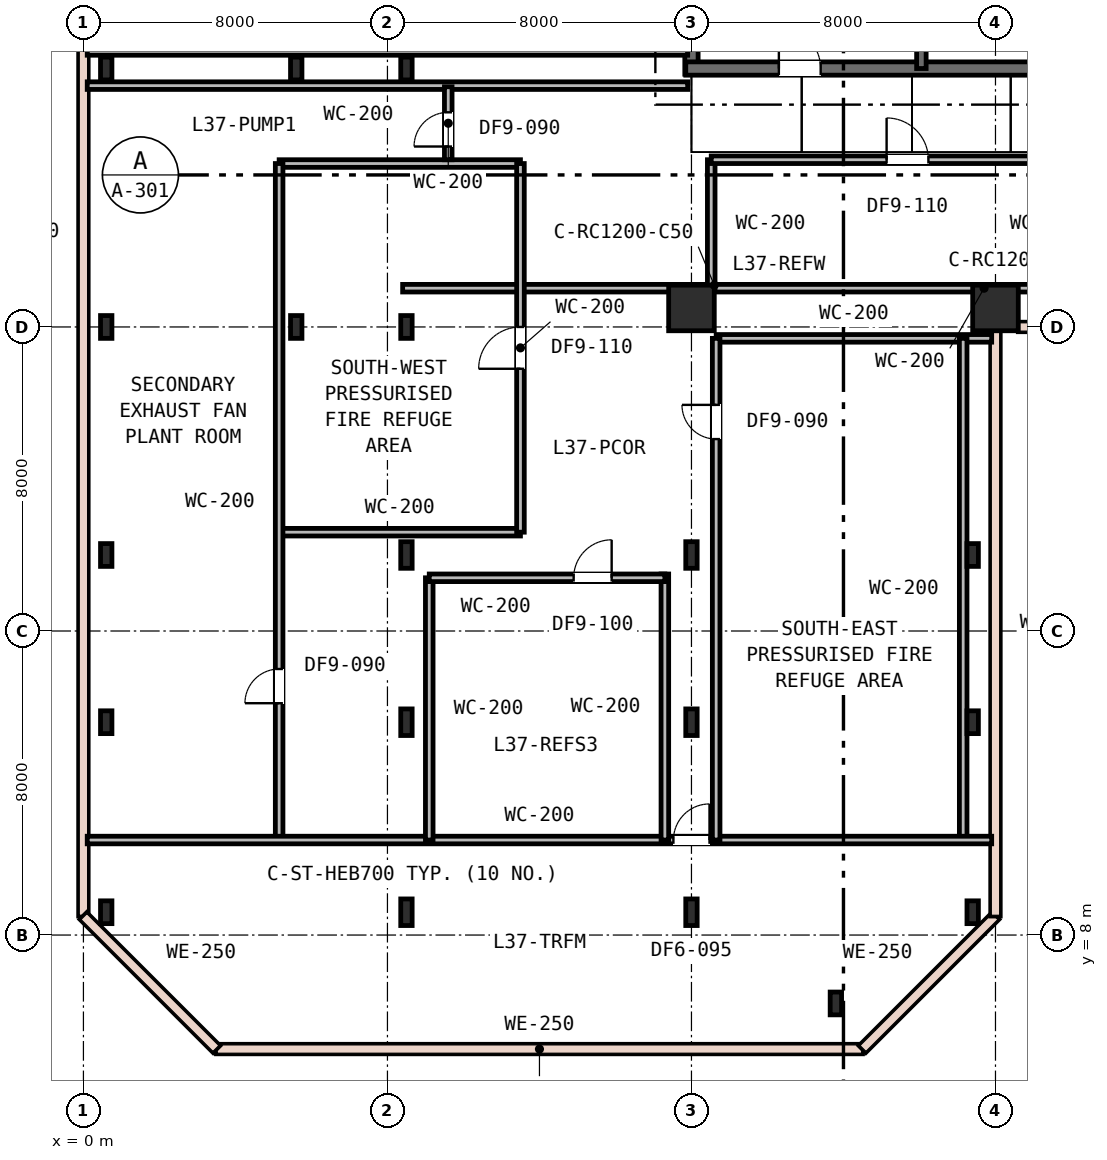
"""IFC4 building model, lengths in metres.
Left out: names, types, materials, properties, quantities, classifications, styles, units other than length and angle.
Written with IfcOpenShell. Run it as: python <this file> out.ifc"""

import sys

from ifc_helpers import new_model, si_unit, direction, frame, frame_2d, origin, origin_2d, place, context, subcontext, project, spatial, rectangle, i_section, extrude, element, fill, save


model = new_model("IFC4")
c1 = context("Model", 3, precision=1e-05, world=origin(), true_north=direction((0.0, 1.0)))
c2 = subcontext(c1, "Body", "Model", "MODEL_VIEW")
j1 = project(units=[si_unit("LENGTHUNIT", "METRE"), si_unit("PLANEANGLEUNIT", "RADIAN")], contexts=[c1])
p1 = place(None, origin())
s1 = spatial("IfcSite", under=j1, at=p1, CompositionType="ELEMENT")
p2 = place(p1, origin())
s2 = spatial("IfcBuilding", under=s1, at=p2, CompositionType="ELEMENT")
p3 = place(p2, frame((0.0, 0.0, 144.0)))
s3 = spatial("IfcBuildingStorey", under=s2, at=p3, CompositionType="ELEMENT", Elevation=144.0)
p4 = place(p3, frame((16.0, 30.65, 0.0), z_axis=(0.0, 0.0, 1.0), x_axis=(0.0, 1.0, 0.0)))
e1 = element("IfcWall", 1, at=p4, inside=s3, PredefinedType="SHEAR", context=c2, shape_type="SweptSolid", body=[
    extrude(rectangle(XDim=12.3, YDim=0.35, at=frame_2d((6.15, 0.0))), origin(), (0.0, 0.0, 1.0), 4.8),
])
p5 = place(p3, frame((15.85, 30.8, 0.0), z_axis=(0.0, 0.0, 1.0), x_axis=(1.0, 0.0, 0.0)))
e2 = element("IfcWall", 2, at=p5, inside=s3, PredefinedType="SHEAR", context=c2, shape_type="SweptSolid", body=[
    extrude(rectangle(XDim=11.2, YDim=0.35, at=frame_2d((5.6, 0.0))), origin(), (0.0, 0.0, 1.0), 4.8),
])
p6 = place(p5, frame((2.45, 0.0, 0.0)))
e3 = element("IfcOpeningElement", 3, at=p6, cuts=e2, PredefinedType="OPENING", context=c2, shape_type="SweptSolid", body=[
    extrude(rectangle(XDim=1.1, YDim=2.15, at=frame_2d((0.55, 1.075))), frame((0.0, 0.185, 0.0), z_axis=(0.0, -1.0, 0.0), x_axis=(1.0, 0.0, 0.0)), (0.0, 0.0, 1.0), 0.37),
])
p7 = place(p3, frame((22.05, 30.8, 0.0), z_axis=(0.0, 0.0, 1.0), x_axis=(0.0, 1.0, 0.0)))
e4 = element("IfcWall", 4, at=p7, inside=s3, PredefinedType="SHEAR", context=c2, shape_type="SweptSolid", body=[
    extrude(rectangle(XDim=6.45, YDim=0.25, at=frame_2d((3.225, 0.0))), origin(), (0.0, 0.0, 1.0), 4.8),
])
p8 = place(p3, frame((8.5, 24.0, 0.0), z_axis=(0.0, 0.0, 1.0), x_axis=(1.0, 0.0, 0.0)))
e5 = element("IfcColumn", 5, at=p8, inside=s3, PredefinedType="COLUMN", context=c2, shape_type="SweptSolid", body=[
    extrude(i_section(OverallWidth=0.3, OverallDepth=0.6, WebThickness=0.015, FlangeThickness=0.03, FilletRadius=0.027, at=origin_2d()), origin(), (0.0, 0.0, 1.0), 4.8),
])
for number, where, z_axis, x_axis in (
    (6, (16.0, 24.5, 0.0), (0.0, 0.0, 1.0), (1.0, 0.0, 0.0)),
    (7, (24.0, 24.5, 0.0), (0.0, 0.0, 1.0), (1.0, 0.0, 0.0)),
):
    element("IfcColumn", number, at=place(p3, frame(where, z_axis=z_axis, x_axis=x_axis)), inside=s3, PredefinedType="COLUMN", context=c2, shape_type="SweptSolid", body=[
        extrude(rectangle(XDim=1.2, YDim=1.2, at=origin_2d()), origin(), (0.0, 0.0, 1.0), 4.8),
    ])
for number, where, z_axis, x_axis in (
    (8, (5.6, 24.0, 0.0), (0.0, 0.0, 1.0), (1.0, 0.0, 0.0)),
    (9, (5.6, 30.8, 0.0), (0.0, 0.0, 1.0), (1.0, 0.0, 0.0)),
    (10, (8.5, 30.8, 0.0), (0.0, 0.0, 1.0), (1.0, 0.0, 0.0)),
):
    element("IfcColumn", number, at=place(p3, frame(where, z_axis=z_axis, x_axis=x_axis)), inside=s3, PredefinedType="COLUMN", context=c2, shape_type="SweptSolid", body=[
        extrude(i_section(OverallWidth=0.3, OverallDepth=0.6, WebThickness=0.015, FlangeThickness=0.03, FilletRadius=0.027, at=origin_2d()), origin(), (0.0, 0.0, 1.0), 4.8),
    ])
for number, where, z_axis, x_axis in (
    (11, (0.6, 24.0, 0.0), (0.0, 0.0, 1.0), (1.0, 0.0, 0.0)),
    (12, (0.6, 30.8, 0.0), (0.0, 0.0, 1.0), (1.0, 0.0, 0.0)),
    (13, (0.6, 8.6, 0.0), (0.0, 0.0, 1.0), (1.0, 0.0, 0.0)),
    (14, (0.6, 13.6, 0.0), (0.0, 0.0, 1.0), (1.0, 0.0, 0.0)),
    (15, (0.6, 18.0, 0.0), (0.0, 0.0, 1.0), (1.0, 0.0, 0.0)),
):
    element("IfcColumn", number, at=place(p3, frame(where, z_axis=z_axis, x_axis=x_axis)), inside=s3, PredefinedType="COLUMN", context=c2, shape_type="SweptSolid", body=[
        extrude(i_section(OverallWidth=0.3, OverallDepth=0.6, WebThickness=0.015, FlangeThickness=0.03, FilletRadius=0.027, at=origin_2d()), origin(), (0.0, 0.0, 1.0), 4.05),
    ])
for number, where, z_axis, x_axis in (
    (16, (19.8, 6.2, 0.0), (0.0, 0.0, 1.0), (1.0, 0.0, 0.0)),
    (17, (23.4, 8.6, 0.0), (0.0, 0.0, 1.0), (1.0, 0.0, 0.0)),
    (18, (23.4, 13.6, 0.0), (0.0, 0.0, 1.0), (1.0, 0.0, 0.0)),
    (19, (23.4, 18.0, 0.0), (0.0, 0.0, 1.0), (1.0, 0.0, 0.0)),
):
    element("IfcColumn", number, at=place(p3, frame(where, z_axis=z_axis, x_axis=x_axis)), inside=s3, PredefinedType="COLUMN", context=c2, shape_type="SweptSolid", body=[
        extrude(i_section(OverallWidth=0.3, OverallDepth=0.6, WebThickness=0.015, FlangeThickness=0.03, FilletRadius=0.027, at=origin_2d()), origin(), (0.0, 0.0, 1.0), 4.8),
    ])
for number, where, z_axis, x_axis in (
    (20, (8.5, 8.6, 0.0), (0.0, 0.0, 1.0), (1.0, 0.0, 0.0)),
    (21, (16.0, 8.6, 0.0), (0.0, 0.0, 1.0), (1.0, 0.0, 0.0)),
    (22, (8.5, 13.6, 0.0), (0.0, 0.0, 1.0), (1.0, 0.0, 0.0)),
    (23, (16.0, 13.6, 0.0), (0.0, 0.0, 1.0), (1.0, 0.0, 0.0)),
    (24, (8.5, 18.0, 0.0), (0.0, 0.0, 1.0), (1.0, 0.0, 0.0)),
    (25, (16.0, 18.0, 0.0), (0.0, 0.0, 1.0), (1.0, 0.0, 0.0)),
):
    element("IfcColumn", number, at=place(p3, frame(where, z_axis=z_axis, x_axis=x_axis)), inside=s3, PredefinedType="COLUMN", context=c2, shape_type="SweptSolid", body=[
        extrude(i_section(OverallWidth=0.3, OverallDepth=0.7, WebThickness=0.017, FlangeThickness=0.032, FilletRadius=0.027, at=origin_2d()), origin(), (0.0, 0.0, 1.0), 4.8),
    ])
p9 = place(p3, frame((3.5, 5.0, 0.0), z_axis=(0.0, 0.0, 1.0), x_axis=(1.0, 0.0, 0.0)))
e26 = element("IfcWall", 26, at=p9, inside=s3, PredefinedType="STANDARD", context=c2, shape_type="SweptSolid", body=[
    extrude(rectangle(XDim=17.0, YDim=0.25, at=frame_2d((8.5, 0.0))), origin(), (0.0, 0.0, 1.0), 1.15),
])
p10 = place(p3, frame((20.5, 5.0, 0.0), z_axis=(0.0, 0.0, 1.0), x_axis=(0.707106781187, 0.707106781187, 0.0)))
e27 = element("IfcWall", 27, at=p10, inside=s3, PredefinedType="STANDARD", context=c2, shape_type="SweptSolid", body=[
    extrude(rectangle(XDim=4.95, YDim=0.25, at=frame_2d((2.475, 0.0))), origin(), (0.0, 0.0, 1.0), 1.15),
])
p11 = place(p3, frame((24.0, 8.5, 0.0), z_axis=(0.0, 0.0, 1.0), x_axis=(0.0, 1.0, 0.0)))
e28 = element("IfcWall", 28, at=p11, inside=s3, PredefinedType="STANDARD", context=c2, shape_type="SweptSolid", body=[
    extrude(rectangle(XDim=15.4, YDim=0.25, at=frame_2d((7.7, 0.0))), origin(), (0.0, 0.0, 1.0), 1.15),
])
p12 = place(p3, frame((24.6, 24.0, 0.0), z_axis=(0.0, 0.0, 1.0), x_axis=(1.0, 0.0, 0.0)))
e29 = element("IfcWall", 29, at=p12, inside=s3, PredefinedType="STANDARD", context=c2, shape_type="SweptSolid", body=[
    extrude(rectangle(XDim=14.3, YDim=0.25, at=frame_2d((7.15, 0.0))), origin(), (0.0, 0.0, 1.0), 1.15),
])
p13 = place(p3, frame((0.0, 44.5, 0.0), z_axis=(0.0, 0.0, 1.0), x_axis=(0.0, -1.0, 0.0)))
e30 = element("IfcWall", 30, at=p13, inside=s3, PredefinedType="STANDARD", context=c2, shape_type="SweptSolid", body=[
    extrude(rectangle(XDim=36.0, YDim=0.25, at=frame_2d((18.0, 0.0))), origin(), (0.0, 0.0, 1.0), 1.15),
])
p14 = place(p3, frame((0.0, 8.5, 0.0), z_axis=(0.0, 0.0, 1.0), x_axis=(0.707106781187, -0.707106781187, 0.0)))
e31 = element("IfcWall", 31, at=p14, inside=s3, PredefinedType="STANDARD", context=c2, shape_type="SweptSolid", body=[
    extrude(rectangle(XDim=4.95, YDim=0.25, at=frame_2d((2.475, 0.0))), origin(), (0.0, 0.0, 1.0), 1.15),
])
p15 = place(p3, frame((8.4, 25.02, 0.0), z_axis=(0.0, 0.0, 1.0), x_axis=(1.0, 0.0, 0.0)))
e32 = element("IfcWall", 32, at=p15, inside=s3, PredefinedType="PARTITIONING", context=c2, shape_type="SweptSolid", body=[
    extrude(rectangle(XDim=30.6, YDim=0.2, at=frame_2d((15.3, 0.0))), origin(), (0.0, 0.0, 1.0), 4.02),
])
p16 = place(p3, frame((16.52, 25.02, 0.0), z_axis=(0.0, 0.0, 1.0), x_axis=(0.0, 1.0, 0.0)))
e33 = element("IfcWall", 33, at=p16, inside=s3, PredefinedType="PARTITIONING", context=c2, shape_type="SweptSolid", body=[
    extrude(rectangle(XDim=3.38, YDim=0.2, at=frame_2d((1.69, 0.0))), origin(), (0.0, 0.0, 1.0), 4.02),
])
for number, where, z_axis, x_axis in (
    (34, (0.1, 30.35, 0.0), (0.0, 0.0, 1.0), (1.0, 0.0, 0.0)),
    (35, (0.1, 31.25, 0.0), (0.0, 0.0, 1.0), (1.0, 0.0, 0.0)),
):
    element("IfcWall", number, at=place(p3, frame(where, z_axis=z_axis, x_axis=x_axis)), inside=s3, PredefinedType="PARTITIONING", context=c2, shape_type="SweptSolid", body=[
        extrude(rectangle(XDim=15.8, YDim=0.2, at=frame_2d((7.9, 0.0))), origin(), (0.0, 0.0, 1.0), 4.02),
    ])
p17 = place(p3, frame((16.52, 28.4, 0.0), z_axis=(0.0, 0.0, 1.0), x_axis=(1.0, 0.0, 0.0)))
e36 = element("IfcWall", 36, at=p17, inside=s3, PredefinedType="PARTITIONING", context=c2, shape_type="SweptSolid", body=[
    extrude(rectangle(XDim=22.46, YDim=0.2, at=frame_2d((11.23, 0.0))), origin(), (0.0, 0.0, 1.0), 4.02),
])
p18 = place(p17, frame((4.615, 0.0, 0.0)))
e37 = element("IfcOpeningElement", 37, at=p18, cuts=e36, PredefinedType="OPENING", context=c2, shape_type="SweptSolid", body=[
    extrude(rectangle(XDim=1.1, YDim=2.15, at=frame_2d((0.55, 1.075))), frame((0.0, 0.11, 0.0), z_axis=(0.0, -1.0, 0.0), x_axis=(1.0, 0.0, 0.0)), (0.0, 0.0, 1.0), 0.22),
])
p19 = place(p17, frame((11.18, 0.0, 0.0)))
e38 = element("IfcOpeningElement", 38, at=p19, cuts=e36, PredefinedType="OPENING", context=c2, shape_type="SweptSolid", body=[
    extrude(rectangle(XDim=0.9, YDim=2.15, at=frame_2d((0.45, 1.075))), frame((0.0, 0.11, 0.0), z_axis=(0.0, -1.0, 0.0), x_axis=(1.0, 0.0, 0.0)), (0.0, 0.0, 1.0), 0.22),
])
p20 = place(p17, frame((17.145, 0.0, 0.0)))
e39 = element("IfcOpeningElement", 39, at=p20, cuts=e36, PredefinedType="OPENING", context=c2, shape_type="SweptSolid", body=[
    extrude(rectangle(XDim=1.1, YDim=2.15, at=frame_2d((0.55, 1.075))), frame((0.0, 0.11, 0.0), z_axis=(0.0, -1.0, 0.0), x_axis=(1.0, 0.0, 0.0)), (0.0, 0.0, 1.0), 0.22),
])
for number, where, z_axis, x_axis in (
    (40, (5.15, 28.3, 0.0), (0.0, 0.0, 1.0), (1.0, 0.0, 0.0)),
    (41, (5.15, 18.6, 0.0), (0.0, 0.0, 1.0), (1.0, 0.0, 0.0)),
):
    element("IfcWall", number, at=place(p3, frame(where, z_axis=z_axis, x_axis=x_axis)), inside=s3, PredefinedType="PARTITIONING", context=c2, shape_type="SweptSolid", body=[
        extrude(rectangle(XDim=6.35, YDim=0.2, at=frame_2d((3.175, 0.0))), origin(), (0.0, 0.0, 1.0), 4.02),
    ])
p21 = place(p3, frame((5.15, 10.5, 0.0), z_axis=(0.0, 0.0, 1.0), x_axis=(0.0, 1.0, 0.0)))
e42 = element("IfcWall", 42, at=p21, inside=s3, PredefinedType="PARTITIONING", context=c2, shape_type="SweptSolid", body=[
    extrude(rectangle(XDim=17.8, YDim=0.2, at=frame_2d((8.9, 0.0))), origin(), (0.0, 0.0, 1.0), 4.02),
])
p22 = place(p21, frame((3.6, 0.0, 0.0)))
e43 = element("IfcOpeningElement", 43, at=p22, cuts=e42, PredefinedType="OPENING", context=c2, shape_type="SweptSolid", body=[
    extrude(rectangle(XDim=0.9, YDim=2.15, at=frame_2d((0.45, 1.075))), frame((0.0, 0.11, 0.0), z_axis=(0.0, -1.0, 0.0), x_axis=(1.0, 0.0, 0.0)), (0.0, 0.0, 1.0), 0.22),
])
p23 = place(p3, frame((11.5, 18.6, 0.0), z_axis=(0.0, 0.0, 1.0), x_axis=(0.0, 1.0, 0.0)))
e44 = element("IfcWall", 44, at=p23, inside=s3, PredefinedType="PARTITIONING", context=c2, shape_type="SweptSolid", body=[
    extrude(rectangle(XDim=9.7, YDim=0.2, at=frame_2d((4.85, 0.0))), origin(), (0.0, 0.0, 1.0), 4.02),
])
p24 = place(p23, frame((4.3, 0.0, 0.0)))
e45 = element("IfcOpeningElement", 45, at=p24, cuts=e44, PredefinedType="OPENING", context=c2, shape_type="SweptSolid", body=[
    extrude(rectangle(XDim=1.1, YDim=2.15, at=frame_2d((0.55, 1.075))), frame((0.0, 0.11, 0.0), z_axis=(0.0, -1.0, 0.0), x_axis=(1.0, 0.0, 0.0)), (0.0, 0.0, 1.0), 0.22),
])
p25 = place(p3, frame((16.65, 23.7, 0.0), z_axis=(0.0, 0.0, 1.0), x_axis=(1.0, 0.0, 0.0)))
e46 = element("IfcWall", 46, at=p25, inside=s3, PredefinedType="PARTITIONING", context=c2, shape_type="SweptSolid", body=[
    extrude(rectangle(XDim=7.25, YDim=0.2, at=frame_2d((3.625, 0.0))), origin(), (0.0, 0.0, 1.0), 4.02),
])
p26 = place(p3, frame((23.15, 10.5, 0.0), z_axis=(0.0, 0.0, 1.0), x_axis=(0.0, 1.0, 0.0)))
e47 = element("IfcWall", 47, at=p26, inside=s3, PredefinedType="PARTITIONING", context=c2, shape_type="SweptSolid", body=[
    extrude(rectangle(XDim=13.2, YDim=0.2, at=frame_2d((6.6, 0.0))), origin(), (0.0, 0.0, 1.0), 4.02),
])
p27 = place(p3, frame((0.1, 10.5, 0.0), z_axis=(0.0, 0.0, 1.0), x_axis=(1.0, 0.0, 0.0)))
e48 = element("IfcWall", 48, at=p27, inside=s3, PredefinedType="PARTITIONING", context=c2, shape_type="SweptSolid", body=[
    extrude(rectangle(XDim=23.8, YDim=0.2, at=frame_2d((11.9, 0.0))), origin(), (0.0, 0.0, 1.0), 4.02),
])
p28 = place(p27, frame((15.425, 0.0, 0.0)))
e49 = element("IfcOpeningElement", 49, at=p28, cuts=e48, PredefinedType="OPENING", context=c2, shape_type="SweptSolid", body=[
    extrude(rectangle(XDim=0.95, YDim=2.15, at=frame_2d((0.475, 1.075))), frame((0.0, 0.11, 0.0), z_axis=(0.0, -1.0, 0.0), x_axis=(1.0, 0.0, 0.0)), (0.0, 0.0, 1.0), 0.22),
])
p29 = place(p3, frame((16.65, 10.5, 0.0), z_axis=(0.0, 0.0, 1.0), x_axis=(0.0, 1.0, 0.0)))
e50 = element("IfcWall", 50, at=p29, inside=s3, PredefinedType="PARTITIONING", context=c2, shape_type="SweptSolid", body=[
    extrude(rectangle(XDim=13.2, YDim=0.2, at=frame_2d((6.6, 0.0))), origin(), (0.0, 0.0, 1.0), 4.02),
])
p30 = place(p29, frame((10.55, 0.0, 0.0)))
e51 = element("IfcOpeningElement", 51, at=p30, cuts=e50, PredefinedType="OPENING", context=c2, shape_type="SweptSolid", body=[
    extrude(rectangle(XDim=0.9, YDim=2.15, at=frame_2d((0.45, 1.075))), frame((0.0, 0.11, 0.0), z_axis=(0.0, -1.0, 0.0), x_axis=(1.0, 0.0, 0.0)), (0.0, 0.0, 1.0), 0.22),
])
p31 = place(p3, frame((9.1, 10.5, 0.0), z_axis=(0.0, 0.0, 1.0), x_axis=(0.0, 1.0, 0.0)))
e52 = element("IfcWall", 52, at=p31, inside=s3, PredefinedType="PARTITIONING", context=c2, shape_type="SweptSolid", body=[
    extrude(rectangle(XDim=6.9, YDim=0.2, at=frame_2d((3.45, 0.0))), origin(), (0.0, 0.0, 1.0), 4.02),
])
p32 = place(p3, frame((15.3, 10.5, 0.0), z_axis=(0.0, 0.0, 1.0), x_axis=(0.0, 1.0, 0.0)))
e53 = element("IfcWall", 53, at=p32, inside=s3, PredefinedType="PARTITIONING", context=c2, shape_type="SweptSolid", body=[
    extrude(rectangle(XDim=7.0, YDim=0.2, at=frame_2d((3.5, 0.0))), origin(), (0.0, 0.0, 1.0), 4.02),
])
p33 = place(p3, frame((9.1, 17.4, 0.0), z_axis=(0.0, 0.0, 1.0), x_axis=(1.0, 0.0, 0.0)))
e54 = element("IfcWall", 54, at=p33, inside=s3, PredefinedType="PARTITIONING", context=c2, shape_type="SweptSolid", body=[
    extrude(rectangle(XDim=6.2, YDim=0.2, at=frame_2d((3.1, 0.0))), origin(), (0.0, 0.0, 1.0), 4.02),
])
p34 = place(p33, frame((3.8, 0.0, 0.0)))
e55 = element("IfcOpeningElement", 55, at=p34, cuts=e54, PredefinedType="OPENING", context=c2, shape_type="SweptSolid", body=[
    extrude(rectangle(XDim=1.0, YDim=2.15, at=frame_2d((0.5, 1.075))), frame((0.0, 0.11, 0.0), z_axis=(0.0, -1.0, 0.0), x_axis=(1.0, 0.0, 0.0)), (0.0, 0.0, 1.0), 0.22),
])
p35 = place(p3, frame((9.6, 28.4, 0.0), z_axis=(0.0, 0.0, 1.0), x_axis=(0.0, 1.0, 0.0)))
e56 = element("IfcWall", 56, at=p35, inside=s3, PredefinedType="PARTITIONING", context=c2, shape_type="SweptSolid", body=[
    extrude(rectangle(XDim=1.92, YDim=0.2, at=frame_2d((0.96, 0.0))), origin(), (0.0, 0.0, 1.0), 4.02),
])
p36 = place(p35, frame((0.348, 0.0, 0.0)))
e57 = element("IfcOpeningElement", 57, at=p36, cuts=e56, PredefinedType="OPENING", context=c2, shape_type="SweptSolid", body=[
    extrude(rectangle(XDim=0.9, YDim=2.15, at=frame_2d((0.45, 1.075))), frame((0.0, 0.11, 0.0), z_axis=(0.0, -1.0, 0.0), x_axis=(1.0, 0.0, 0.0)), (0.0, 0.0, 1.0), 0.22),
])
p37 = place(p6, origin())
e58 = element("IfcDoor", 58, at=p37, inside=s3, OperationType="SINGLE_SWING_LEFT", PredefinedType="DOOR", context=c2, shape_type="SweptSolid", body=[
    extrude(rectangle(XDim=1.1, YDim=2.15, at=frame_2d((0.55, 1.075))), frame((0.0, 0.025, 0.0), z_axis=(0.0, -1.0, 0.0), x_axis=(1.0, 0.0, 0.0)), (0.0, 0.0, 1.0), 0.05),
])
fill(e3, e58)
p38 = place(p18, origin())
e59 = element("IfcDoor", 59, at=p38, inside=s3, OperationType="SINGLE_SWING_LEFT", PredefinedType="DOOR", context=c2, shape_type="SweptSolid", body=[
    extrude(rectangle(XDim=1.1, YDim=2.15, at=frame_2d((0.55, 1.075))), frame((0.0, 0.025, 0.0), z_axis=(0.0, -1.0, 0.0), x_axis=(1.0, 0.0, 0.0)), (0.0, 0.0, 1.0), 0.05),
])
fill(e37, e59)
p39 = place(p24, origin())
e60 = element("IfcDoor", 60, at=p39, inside=s3, OperationType="SINGLE_SWING_LEFT", PredefinedType="DOOR", context=c2, shape_type="SweptSolid", body=[
    extrude(rectangle(XDim=1.1, YDim=2.15, at=frame_2d((0.55, 1.075))), frame((0.0, 0.025, 0.0), z_axis=(0.0, -1.0, 0.0), x_axis=(1.0, 0.0, 0.0)), (0.0, 0.0, 1.0), 0.05),
])
fill(e45, e60)
p40 = place(p30, origin())
e61 = element("IfcDoor", 61, at=p40, inside=s3, OperationType="SINGLE_SWING_RIGHT", PredefinedType="DOOR", context=c2, shape_type="SweptSolid", body=[
    extrude(rectangle(XDim=0.9, YDim=2.15, at=frame_2d((0.45, 1.075))), frame((0.0, 0.025, 0.0), z_axis=(0.0, -1.0, 0.0), x_axis=(1.0, 0.0, 0.0)), (0.0, 0.0, 1.0), 0.05),
])
fill(e51, e61)
p41 = place(p34, origin())
e62 = element("IfcDoor", 62, at=p41, inside=s3, OperationType="SINGLE_SWING_RIGHT", PredefinedType="DOOR", context=c2, shape_type="SweptSolid", body=[
    extrude(rectangle(XDim=1.0, YDim=2.15, at=frame_2d((0.5, 1.075))), frame((0.0, 0.025, 0.0), z_axis=(0.0, -1.0, 0.0), x_axis=(1.0, 0.0, 0.0)), (0.0, 0.0, 1.0), 0.05),
])
fill(e55, e62)
p42 = place(p36, origin())
e63 = element("IfcDoor", 63, at=p42, inside=s3, OperationType="SINGLE_SWING_LEFT", PredefinedType="DOOR", context=c2, shape_type="SweptSolid", body=[
    extrude(rectangle(XDim=0.9, YDim=2.15, at=frame_2d((0.45, 1.075))), frame((0.0, 0.025, 0.0), z_axis=(0.0, -1.0, 0.0), x_axis=(1.0, 0.0, 0.0)), (0.0, 0.0, 1.0), 0.05),
])
fill(e57, e63)
p43 = place(p22, origin())
e64 = element("IfcDoor", 64, at=p43, inside=s3, OperationType="SINGLE_SWING_LEFT", PredefinedType="DOOR", context=c2, shape_type="SweptSolid", body=[
    extrude(rectangle(XDim=0.9, YDim=2.15, at=frame_2d((0.45, 1.075))), frame((0.0, 0.025, 0.0), z_axis=(0.0, -1.0, 0.0), x_axis=(1.0, 0.0, 0.0)), (0.0, 0.0, 1.0), 0.05),
])
fill(e43, e64)
p44 = place(p28, origin())
e65 = element("IfcDoor", 65, at=p44, inside=s3, OperationType="SINGLE_SWING_RIGHT", PredefinedType="DOOR", context=c2, shape_type="SweptSolid", body=[
    extrude(rectangle(XDim=0.95, YDim=2.15, at=frame_2d((0.475, 1.075))), frame((0.0, 0.025, 0.0), z_axis=(0.0, -1.0, 0.0), x_axis=(1.0, 0.0, 0.0)), (0.0, 0.0, 1.0), 0.05),
])
fill(e49, e65)
save(model, sys.argv[1])
